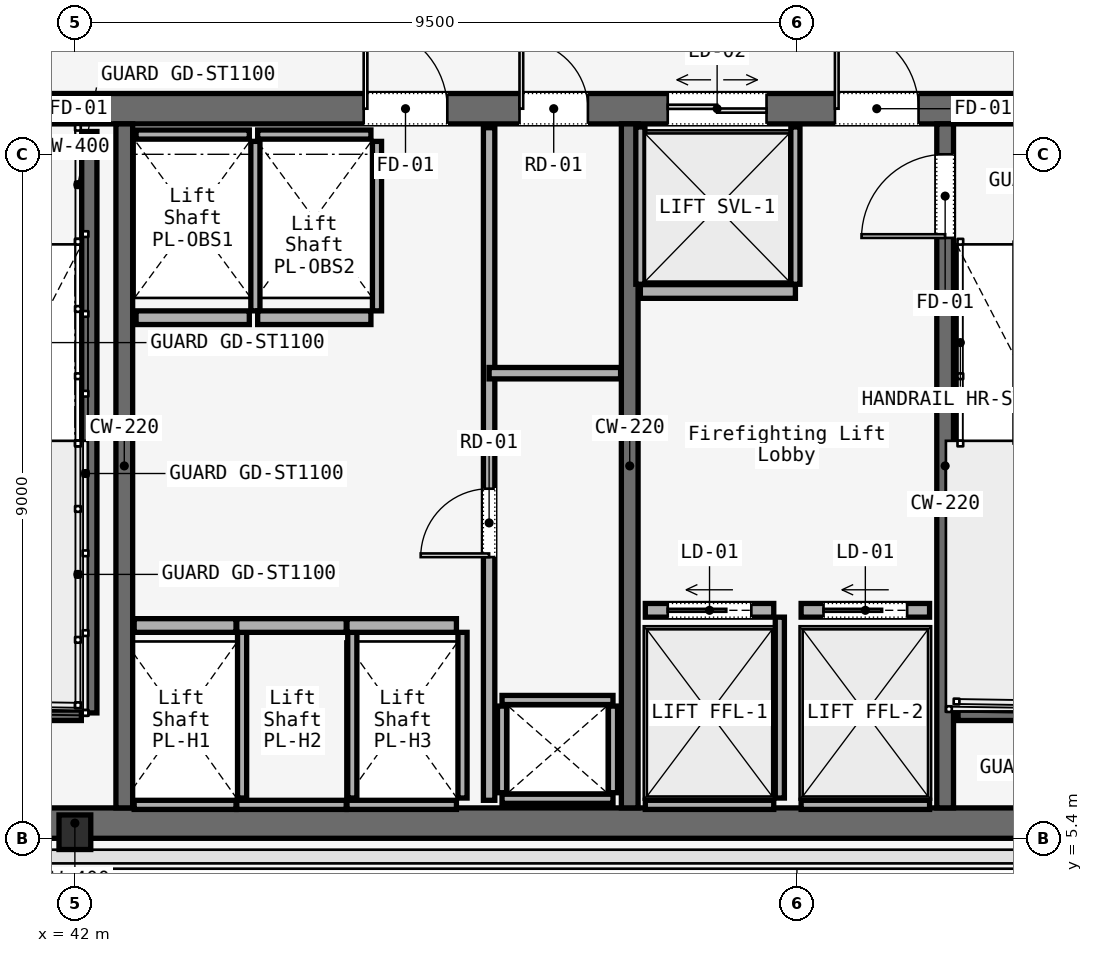
"""IFC4 building model, lengths in metres.
Left out: names, types, materials, properties, quantities, classifications, styles, units other than length and angle.
Written with IfcOpenShell. Run it as: python <this file> out.ifc"""

import sys

from ifc_helpers import new_model, si_unit, direction, frame, frame_2d, origin, origin_2d, place, context, subcontext, project, spatial, rectangle, i_section, extrude, element, fill, save


model = new_model("IFC4")
c1 = context("Model", 3, precision=1e-05, world=origin(), true_north=direction((0.0, 1.0)))
c2 = subcontext(c1, "Body", "Model", "MODEL_VIEW")
j1 = project(units=[si_unit("LENGTHUNIT", "METRE"), si_unit("PLANEANGLEUNIT", "RADIAN")], contexts=[c1])
p1 = place(None, origin())
s1 = spatial("IfcSite", under=j1, at=p1, CompositionType="ELEMENT")
p2 = place(p1, origin())
s2 = spatial("IfcBuilding", under=s1, at=p2, CompositionType="ELEMENT")
p3 = place(p2, frame((0.0, 0.0, 184.0)))
s3 = spatial("IfcBuildingStorey", under=s2, at=p3, CompositionType="ELEMENT", Elevation=184.0)
p4 = place(p3, frame((26.45, 15.0, 0.0), z_axis=(0.0, 0.0, 1.0), x_axis=(1.0, 0.0, 0.0)))
e1 = element("IfcWall", 1, at=p4, inside=s3, PredefinedType="SOLIDWALL", context=c2, shape_type="SweptSolid", body=[
    extrude(rectangle(XDim=31.1, YDim=0.4, at=frame_2d((15.55, 0.0))), origin(), (0.0, 0.0, 1.0), 3.58),
])
p5 = place(p4, frame((1.65, 0.0, 0.0)))
e2 = element("IfcOpeningElement", 2, at=p5, cuts=e1, PredefinedType="OPENING", context=c2, shape_type="SweptSolid", body=[
    extrude(rectangle(XDim=1.1, YDim=2.2, at=frame_2d((0.55, 1.1))), frame((0.0, 0.2, 0.0), z_axis=(0.0, -1.0, 0.0), x_axis=(1.0, 0.0, 0.0)), (0.0, 0.0, 1.0), 0.4),
])
p6 = place(p4, frame((13.65, 0.0, 0.0)))
e3 = element("IfcOpeningElement", 3, at=p6, cuts=e1, PredefinedType="OPENING", context=c2, shape_type="SweptSolid", body=[
    extrude(rectangle(XDim=1.1, YDim=2.2, at=frame_2d((0.55, 1.1))), frame((0.0, 0.2, 0.0), z_axis=(0.0, -1.0, 0.0), x_axis=(1.0, 0.0, 0.0)), (0.0, 0.0, 1.0), 0.4),
])
p7 = place(p4, frame((25.55, 0.0, 0.0)))
e4 = element("IfcOpeningElement", 4, at=p7, cuts=e1, PredefinedType="OPENING", context=c2, shape_type="SweptSolid", body=[
    extrude(rectangle(XDim=1.1, YDim=2.2, at=frame_2d((0.55, 1.1))), frame((0.0, 0.2, 0.0), z_axis=(0.0, -1.0, 0.0), x_axis=(1.0, 0.0, 0.0)), (0.0, 0.0, 1.0), 0.4),
])
p8 = place(p4, frame((10.7, 0.0, 0.0)))
e5 = element("IfcOpeningElement", 5, at=p8, cuts=e1, PredefinedType="OPENING", context=c2, shape_type="SweptSolid", body=[
    extrude(rectangle(XDim=1.4, YDim=2.2, at=frame_2d((0.7, 1.1))), frame((0.0, 0.2, 0.0), z_axis=(0.0, -1.0, 0.0), x_axis=(1.0, 0.0, 0.0)), (0.0, 0.0, 1.0), 0.4),
])
p9 = place(p4, frame((19.35, 0.0, 0.0)))
e6 = element("IfcOpeningElement", 6, at=p9, cuts=e1, PredefinedType="OPENING", context=c2, shape_type="SweptSolid", body=[
    extrude(rectangle(XDim=1.1, YDim=2.2, at=frame_2d((0.55, 1.1))), frame((0.0, 0.2, 0.0), z_axis=(0.0, -1.0, 0.0), x_axis=(1.0, 0.0, 0.0)), (0.0, 0.0, 1.0), 0.4),
])
p10 = place(p4, frame((21.4, 0.0, 0.0)))
e7 = element("IfcOpeningElement", 7, at=p10, cuts=e1, PredefinedType="OPENING", context=c2, shape_type="SweptSolid", body=[
    extrude(rectangle(XDim=0.9, YDim=2.1, at=frame_2d((0.45, 1.05))), frame((0.0, 0.2, 0.0), z_axis=(0.0, -1.0, 0.0), x_axis=(1.0, 0.0, 0.0)), (0.0, 0.0, 1.0), 0.4),
])
p11 = place(p4, frame((23.35, 0.0, 0.0)))
e8 = element("IfcOpeningElement", 8, at=p11, cuts=e1, PredefinedType="OPENING", context=c2, shape_type="SweptSolid", body=[
    extrude(rectangle(XDim=1.3, YDim=2.3, at=frame_2d((0.65, 1.15))), frame((0.0, 0.2, 0.0), z_axis=(0.0, -1.0, 0.0), x_axis=(1.0, 0.0, 0.0)), (0.0, 0.0, 1.0), 0.4),
])
p12 = place(p3, frame((26.45, 5.6, 0.0), z_axis=(0.0, 0.0, 1.0), x_axis=(1.0, 0.0, 0.0)))
e9 = element("IfcWall", 9, at=p12, inside=s3, PredefinedType="SOLIDWALL", context=c2, shape_type="SweptSolid", body=[
    extrude(rectangle(XDim=31.1, YDim=0.4, at=frame_2d((15.55, 0.0))), origin(), (0.0, 0.0, 1.0), 3.58),
])
for number, where, z_axis, x_axis in (
    (10, (42.65, 5.8, 0.0), (0.0, 0.0, 1.0), (0.0, 1.0, 0.0)),
    (11, (49.3, 5.8, 0.0), (0.0, 0.0, 1.0), (0.0, 1.0, 0.0)),
):
    element("IfcWall", number, at=place(p3, frame(where, z_axis=z_axis, x_axis=x_axis)), inside=s3, PredefinedType="SOLIDWALL", context=c2, shape_type="SweptSolid", body=[
        extrude(rectangle(XDim=9.0, YDim=0.22, at=frame_2d((4.5, 0.0))), origin(), (0.0, 0.0, 1.0), 3.58),
    ])
p13 = place(p3, frame((53.45, 5.8, 0.0), z_axis=(0.0, 0.0, 1.0), x_axis=(0.0, 1.0, 0.0)))
e12 = element("IfcWall", 12, at=p13, inside=s3, PredefinedType="SOLIDWALL", context=c2, shape_type="SweptSolid", body=[
    extrude(rectangle(XDim=9.0, YDim=0.22, at=frame_2d((4.5, 0.0))), origin(), (0.0, 0.0, 1.0), 3.58),
])
p14 = place(p13, frame((7.5, 0.0, 0.0)))
e13 = element("IfcOpeningElement", 13, at=p14, cuts=e12, PredefinedType="OPENING", context=c2, shape_type="SweptSolid", body=[
    extrude(rectangle(XDim=1.1, YDim=2.2, at=frame_2d((0.55, 1.1))), frame((0.0, 0.11, 0.0), z_axis=(0.0, -1.0, 0.0), x_axis=(1.0, 0.0, 0.0)), (0.0, 0.0, 1.0), 0.22),
])
p15 = place(p3, frame((42.0, 5.48, 0.0), z_axis=(0.0, 0.0, 1.0), x_axis=(1.0, 0.0, 0.0)))
e14 = element("IfcColumn", 14, at=p15, inside=s3, PredefinedType="COLUMN", context=c2, shape_type="SweptSolid", body=[
    extrude(i_section(OverallWidth=0.418, OverallDepth=0.455, WebThickness=0.042, FlangeThickness=0.052, FilletRadius=0.015, at=origin_2d()), origin(), (0.0, 0.0, 1.0), 3.58),
])
p16 = place(p3, frame((42.19, 14.7, 0.0), z_axis=(0.0, 0.0, 1.0), x_axis=(0.0, -1.0, 0.0)))
e15 = element("IfcWall", 15, at=p16, inside=s3, PredefinedType="SOLIDWALL", context=c2, shape_type="SweptSolid", body=[
    extrude(rectangle(XDim=7.65, YDim=0.2, at=frame_2d((3.825, 0.0))), origin(), (0.0, 0.0, 1.0), 3.8),
])
for number, where, z_axis, x_axis in (
    (16, (38.97, 7.05, 0.0), (0.0, 0.0, 1.0), (1.0, 0.0, 0.0)),
    (17, (53.62, 7.05, 0.0), (0.0, 0.0, 1.0), (1.0, 0.0, 0.0)),
):
    element("IfcWall", number, at=place(p3, frame(where, z_axis=z_axis, x_axis=x_axis)), inside=s3, PredefinedType="SOLIDWALL", context=c2, shape_type="SweptSolid", body=[
        extrude(rectangle(XDim=3.115, YDim=0.2, at=frame_2d((1.558, 0.0))), origin(), (0.0, 0.0, 1.0), 3.8),
    ])
for number, where, z_axis, x_axis in (
    (18, (47.62, 5.92, 0.0), (0.0, 0.0, 1.0), (1.0, 0.0, 0.0)),
    (19, (47.62, 7.22, 0.0), (0.0, 0.0, 1.0), (1.0, 0.0, 0.0)),
):
    element("IfcWall", number, at=place(p3, frame(where, z_axis=z_axis, x_axis=x_axis)), inside=s3, PredefinedType="SOLIDWALL", context=c2, shape_type="SweptSolid", body=[
        extrude(rectangle(XDim=1.46, YDim=0.12, at=frame_2d((0.73, 0.0))), origin(), (0.0, 0.0, 1.0), 3.01),
    ])
for number, where, z_axis, x_axis in (
    (20, (47.62, 6.0, 0.0), (0.0, 0.0, 1.0), (0.0, 1.0, 0.0)),
    (21, (49.08, 6.0, 0.0), (0.0, 0.0, 1.0), (0.0, 1.0, 0.0)),
):
    element("IfcWall", number, at=place(p3, frame(where, z_axis=z_axis, x_axis=x_axis)), inside=s3, PredefinedType="SOLIDWALL", context=c2, shape_type="SweptSolid", body=[
        extrude(rectangle(XDim=1.14, YDim=0.12, at=frame_2d((0.57, 0.0))), origin(), (0.0, 0.0, 1.0), 3.01),
    ])
p17 = place(p3, frame((47.45, 5.9, 0.0), z_axis=(0.0, 0.0, 1.0), x_axis=(0.0, 1.0, 0.0)))
e22 = element("IfcWall", 22, at=p17, inside=s3, PredefinedType="PARTITIONING", context=c2, shape_type="SweptSolid", body=[
    extrude(rectangle(XDim=8.85, YDim=0.15, at=frame_2d((4.425, 0.0))), origin(), (0.0, 0.0, 1.0), 3.01),
])
p18 = place(p17, frame((3.2, 0.0, 0.0)))
e23 = element("IfcOpeningElement", 23, at=p18, cuts=e22, PredefinedType="OPENING", context=c2, shape_type="SweptSolid", body=[
    extrude(rectangle(XDim=0.9, YDim=2.1, at=frame_2d((0.45, 1.05))), frame((0.0, 0.075, 0.0), z_axis=(0.0, -1.0, 0.0), x_axis=(1.0, 0.0, 0.0)), (0.0, 0.0, 1.0), 0.15),
])
p19 = place(p3, frame((47.45, 11.52, 0.0), z_axis=(0.0, 0.0, 1.0), x_axis=(1.0, 0.0, 0.0)))
e24 = element("IfcWall", 24, at=p19, inside=s3, PredefinedType="PARTITIONING", context=c2, shape_type="SweptSolid", body=[
    extrude(rectangle(XDim=1.73, YDim=0.15, at=frame_2d((0.865, 0.0))), origin(), (0.0, 0.0, 1.0), 3.01),
])
p20 = place(p3, frame((42.78, 8.2, 0.0), z_axis=(0.0, 0.0, 1.0), x_axis=(1.0, 0.0, 0.0)))
e25 = element("IfcWall", 25, at=p20, inside=s3, PredefinedType="SOLIDWALL", context=c2, shape_type="SweptSolid", body=[
    extrude(rectangle(XDim=1.34, YDim=0.18, at=frame_2d((0.67, 0.0))), origin(), (0.0, 0.0, 1.0), 3.01),
])
p21 = place(p3, frame((42.78, 5.84, 0.0), z_axis=(0.0, 0.0, 1.0), x_axis=(1.0, 0.0, 0.0)))
e26 = element("IfcWall", 26, at=p21, inside=s3, PredefinedType="SOLIDWALL", context=c2, shape_type="SweptSolid", body=[
    extrude(rectangle(XDim=1.34, YDim=0.12, at=frame_2d((0.67, 0.0))), origin(), (0.0, 0.0, 1.0), 3.01),
])
p22 = place(p3, frame((44.2, 5.93, 0.0), z_axis=(0.0, 0.0, 1.0), x_axis=(0.0, 1.0, 0.0)))
e27 = element("IfcWall", 27, at=p22, inside=s3, PredefinedType="SOLIDWALL", context=c2, shape_type="SweptSolid", body=[
    extrude(rectangle(XDim=2.18, YDim=0.12, at=frame_2d((1.09, 0.0))), origin(), (0.0, 0.0, 1.0), 3.01),
])
p23 = place(p3, frame((44.13, 8.2, 0.0), z_axis=(0.0, 0.0, 1.0), x_axis=(1.0, 0.0, 0.0)))
e28 = element("IfcWall", 28, at=p23, inside=s3, PredefinedType="SOLIDWALL", context=c2, shape_type="SweptSolid", body=[
    extrude(rectangle(XDim=1.44, YDim=0.18, at=frame_2d((0.72, 0.0))), origin(), (0.0, 0.0, 1.0), 3.01),
])
p24 = place(p3, frame((44.13, 5.84, 0.0), z_axis=(0.0, 0.0, 1.0), x_axis=(1.0, 0.0, 0.0)))
e29 = element("IfcWall", 29, at=p24, inside=s3, PredefinedType="SOLIDWALL", context=c2, shape_type="SweptSolid", body=[
    extrude(rectangle(XDim=1.44, YDim=0.12, at=frame_2d((0.72, 0.0))), origin(), (0.0, 0.0, 1.0), 3.01),
])
p25 = place(p3, frame((45.65, 5.93, 0.0), z_axis=(0.0, 0.0, 1.0), x_axis=(0.0, 1.0, 0.0)))
e30 = element("IfcWall", 30, at=p25, inside=s3, PredefinedType="SOLIDWALL", context=c2, shape_type="SweptSolid", body=[
    extrude(rectangle(XDim=2.18, YDim=0.12, at=frame_2d((1.09, 0.0))), origin(), (0.0, 0.0, 1.0), 3.01),
])
p26 = place(p3, frame((45.58, 8.2, 0.0), z_axis=(0.0, 0.0, 1.0), x_axis=(1.0, 0.0, 0.0)))
e31 = element("IfcWall", 31, at=p26, inside=s3, PredefinedType="SOLIDWALL", context=c2, shape_type="SweptSolid", body=[
    extrude(rectangle(XDim=1.44, YDim=0.18, at=frame_2d((0.72, 0.0))), origin(), (0.0, 0.0, 1.0), 3.01),
])
p27 = place(p3, frame((45.58, 5.84, 0.0), z_axis=(0.0, 0.0, 1.0), x_axis=(1.0, 0.0, 0.0)))
e32 = element("IfcWall", 32, at=p27, inside=s3, PredefinedType="SOLIDWALL", context=c2, shape_type="SweptSolid", body=[
    extrude(rectangle(XDim=1.44, YDim=0.12, at=frame_2d((0.72, 0.0))), origin(), (0.0, 0.0, 1.0), 3.01),
])
p28 = place(p3, frame((47.1, 5.93, 0.0), z_axis=(0.0, 0.0, 1.0), x_axis=(0.0, 1.0, 0.0)))
e33 = element("IfcWall", 33, at=p28, inside=s3, PredefinedType="SOLIDWALL", context=c2, shape_type="SweptSolid", body=[
    extrude(rectangle(XDim=2.18, YDim=0.12, at=frame_2d((1.09, 0.0))), origin(), (0.0, 0.0, 1.0), 3.01),
])
p29 = place(p3, frame((42.805, 12.25, 0.0), z_axis=(0.0, 0.0, 1.0), x_axis=(1.0, 0.0, 0.0)))
e34 = element("IfcWall", 34, at=p29, inside=s3, PredefinedType="SOLIDWALL", context=c2, shape_type="SweptSolid", body=[
    extrude(rectangle(XDim=1.49, YDim=0.18, at=frame_2d((0.745, 0.0))), origin(), (0.0, 0.0, 1.0), 3.01),
])
p30 = place(p3, frame((42.805, 14.66, 0.0), z_axis=(0.0, 0.0, 1.0), x_axis=(1.0, 0.0, 0.0)))
e35 = element("IfcWall", 35, at=p30, inside=s3, PredefinedType="SOLIDWALL", context=c2, shape_type="SweptSolid", body=[
    extrude(rectangle(XDim=1.49, YDim=0.12, at=frame_2d((0.745, 0.0))), origin(), (0.0, 0.0, 1.0), 3.01),
])
p31 = place(p3, frame((44.375, 12.34, 0.0), z_axis=(0.0, 0.0, 1.0), x_axis=(0.0, 1.0, 0.0)))
e36 = element("IfcWall", 36, at=p31, inside=s3, PredefinedType="SOLIDWALL", context=c2, shape_type="SweptSolid", body=[
    extrude(rectangle(XDim=2.23, YDim=0.12, at=frame_2d((1.115, 0.0))), origin(), (0.0, 0.0, 1.0), 3.01),
])
p32 = place(p3, frame((44.405, 12.25, 0.0), z_axis=(0.0, 0.0, 1.0), x_axis=(1.0, 0.0, 0.0)))
e37 = element("IfcWall", 37, at=p32, inside=s3, PredefinedType="SOLIDWALL", context=c2, shape_type="SweptSolid", body=[
    extrude(rectangle(XDim=1.49, YDim=0.18, at=frame_2d((0.745, 0.0))), origin(), (0.0, 0.0, 1.0), 3.01),
])
p33 = place(p3, frame((44.405, 14.66, 0.0), z_axis=(0.0, 0.0, 1.0), x_axis=(1.0, 0.0, 0.0)))
e38 = element("IfcWall", 38, at=p33, inside=s3, PredefinedType="SOLIDWALL", context=c2, shape_type="SweptSolid", body=[
    extrude(rectangle(XDim=1.49, YDim=0.12, at=frame_2d((0.745, 0.0))), origin(), (0.0, 0.0, 1.0), 3.01),
])
p34 = place(p3, frame((45.975, 12.34, 0.0), z_axis=(0.0, 0.0, 1.0), x_axis=(0.0, 1.0, 0.0)))
e39 = element("IfcWall", 39, at=p34, inside=s3, PredefinedType="SOLIDWALL", context=c2, shape_type="SweptSolid", body=[
    extrude(rectangle(XDim=2.23, YDim=0.12, at=frame_2d((1.115, 0.0))), origin(), (0.0, 0.0, 1.0), 3.01),
])
p35 = place(p3, frame((49.505, 8.4, 0.0), z_axis=(0.0, 0.0, 1.0), x_axis=(1.0, 0.0, 0.0)))
e40 = element("IfcWall", 40, at=p35, inside=s3, PredefinedType="SOLIDWALL", context=c2, shape_type="SweptSolid", body=[
    extrude(rectangle(XDim=1.69, YDim=0.18, at=frame_2d((0.845, 0.0))), origin(), (0.0, 0.0, 1.0), 3.01),
])
p36 = place(p35, frame((0.295, 0.0, 0.0)))
e41 = element("IfcOpeningElement", 41, at=p36, cuts=e40, PredefinedType="OPENING", context=c2, shape_type="SweptSolid", body=[
    extrude(rectangle(XDim=1.1, YDim=2.2, at=frame_2d((0.55, 1.1))), frame((0.0, 0.09, 0.0), z_axis=(0.0, -1.0, 0.0), x_axis=(1.0, 0.0, 0.0)), (0.0, 0.0, 1.0), 0.18),
])
p37 = place(p3, frame((49.505, 5.84, 0.0), z_axis=(0.0, 0.0, 1.0), x_axis=(1.0, 0.0, 0.0)))
e42 = element("IfcWall", 42, at=p37, inside=s3, PredefinedType="SOLIDWALL", context=c2, shape_type="SweptSolid", body=[
    extrude(rectangle(XDim=1.69, YDim=0.12, at=frame_2d((0.845, 0.0))), origin(), (0.0, 0.0, 1.0), 3.01),
])
p38 = place(p3, frame((51.275, 5.93, 0.0), z_axis=(0.0, 0.0, 1.0), x_axis=(0.0, 1.0, 0.0)))
e43 = element("IfcWall", 43, at=p38, inside=s3, PredefinedType="SOLIDWALL", context=c2, shape_type="SweptSolid", body=[
    extrude(rectangle(XDim=2.38, YDim=0.12, at=frame_2d((1.19, 0.0))), origin(), (0.0, 0.0, 1.0), 3.01),
])
p39 = place(p3, frame((51.555, 8.4, 0.0), z_axis=(0.0, 0.0, 1.0), x_axis=(1.0, 0.0, 0.0)))
e44 = element("IfcWall", 44, at=p39, inside=s3, PredefinedType="SOLIDWALL", context=c2, shape_type="SweptSolid", body=[
    extrude(rectangle(XDim=1.69, YDim=0.18, at=frame_2d((0.845, 0.0))), origin(), (0.0, 0.0, 1.0), 3.01),
])
p40 = place(p39, frame((0.295, 0.0, 0.0)))
e45 = element("IfcOpeningElement", 45, at=p40, cuts=e44, PredefinedType="OPENING", context=c2, shape_type="SweptSolid", body=[
    extrude(rectangle(XDim=1.1, YDim=2.2, at=frame_2d((0.55, 1.1))), frame((0.0, 0.09, 0.0), z_axis=(0.0, -1.0, 0.0), x_axis=(1.0, 0.0, 0.0)), (0.0, 0.0, 1.0), 0.18),
])
p41 = place(p3, frame((51.555, 5.84, 0.0), z_axis=(0.0, 0.0, 1.0), x_axis=(1.0, 0.0, 0.0)))
e46 = element("IfcWall", 46, at=p41, inside=s3, PredefinedType="SOLIDWALL", context=c2, shape_type="SweptSolid", body=[
    extrude(rectangle(XDim=1.69, YDim=0.12, at=frame_2d((0.845, 0.0))), origin(), (0.0, 0.0, 1.0), 3.01),
])
p42 = place(p3, frame((49.44, 12.595, 0.0), z_axis=(0.0, 0.0, 1.0), x_axis=(1.0, 0.0, 0.0)))
e47 = element("IfcWall", 47, at=p42, inside=s3, PredefinedType="SOLIDWALL", context=c2, shape_type="SweptSolid", body=[
    extrude(rectangle(XDim=2.04, YDim=0.18, at=frame_2d((1.02, 0.0))), origin(), (0.0, 0.0, 1.0), 3.01),
])
for number, where, z_axis, x_axis in (
    (48, (49.44, 12.69, 0.0), (0.0, 0.0, 1.0), (0.0, 1.0, 0.0)),
    (49, (51.48, 12.69, 0.0), (0.0, 0.0, 1.0), (0.0, 1.0, 0.0)),
):
    element("IfcWall", number, at=place(p3, frame(where, z_axis=z_axis, x_axis=x_axis)), inside=s3, PredefinedType="SOLIDWALL", context=c2, shape_type="SweptSolid", body=[
        extrude(rectangle(XDim=2.07, YDim=0.12, at=frame_2d((1.035, 0.0))), origin(), (0.0, 0.0, 1.0), 3.01),
    ])
p43 = place(p7, origin())
e50 = element("IfcDoor", 50, at=p43, inside=s3, OperationType="SINGLE_SWING_RIGHT", PredefinedType="DOOR", context=c2, shape_type="SweptSolid", body=[
    extrude(rectangle(XDim=1.1, YDim=2.2, at=frame_2d((0.55, 1.1))), frame((0.0, 0.025, 0.0), z_axis=(0.0, -1.0, 0.0), x_axis=(1.0, 0.0, 0.0)), (0.0, 0.0, 1.0), 0.05),
])
fill(e4, e50)
p44 = place(p9, origin())
e51 = element("IfcDoor", 51, at=p44, inside=s3, OperationType="SINGLE_SWING_LEFT", PredefinedType="DOOR", context=c2, shape_type="SweptSolid", body=[
    extrude(rectangle(XDim=1.1, YDim=2.2, at=frame_2d((0.55, 1.1))), frame((0.0, 0.025, 0.0), z_axis=(0.0, -1.0, 0.0), x_axis=(1.0, 0.0, 0.0)), (0.0, 0.0, 1.0), 0.05),
])
fill(e6, e51)
p45 = place(p10, origin())
e52 = element("IfcDoor", 52, at=p45, inside=s3, OperationType="SINGLE_SWING_LEFT", PredefinedType="DOOR", context=c2, shape_type="SweptSolid", body=[
    extrude(rectangle(XDim=0.9, YDim=2.1, at=frame_2d((0.45, 1.05))), frame((0.0, 0.025, 0.0), z_axis=(0.0, -1.0, 0.0), x_axis=(1.0, 0.0, 0.0)), (0.0, 0.0, 1.0), 0.05),
])
fill(e7, e52)
p46 = place(p14, origin())
e53 = element("IfcDoor", 53, at=p46, inside=s3, OperationType="SINGLE_SWING_LEFT", PredefinedType="DOOR", context=c2, shape_type="SweptSolid", body=[
    extrude(rectangle(XDim=1.1, YDim=2.2, at=frame_2d((0.55, 1.1))), frame((0.0, 0.025, 0.0), z_axis=(0.0, -1.0, 0.0), x_axis=(1.0, 0.0, 0.0)), (0.0, 0.0, 1.0), 0.05),
])
fill(e13, e53)
p47 = place(p18, origin())
e54 = element("IfcDoor", 54, at=p47, inside=s3, OperationType="SINGLE_SWING_LEFT", PredefinedType="DOOR", context=c2, shape_type="SweptSolid", body=[
    extrude(rectangle(XDim=0.9, YDim=2.1, at=frame_2d((0.45, 1.05))), frame((0.0, 0.025, 0.0), z_axis=(0.0, -1.0, 0.0), x_axis=(1.0, 0.0, 0.0)), (0.0, 0.0, 1.0), 0.05),
])
fill(e23, e54)
p48 = place(p36, origin())
e55 = element("IfcDoor", 55, at=p48, inside=s3, OperationType="SLIDING_TO_LEFT", PredefinedType="DOOR", context=c2, shape_type="SweptSolid", body=[
    extrude(rectangle(XDim=1.1, YDim=2.2, at=frame_2d((0.55, 1.1))), frame((0.0, 0.025, 0.0), z_axis=(0.0, -1.0, 0.0), x_axis=(1.0, 0.0, 0.0)), (0.0, 0.0, 1.0), 0.05),
])
fill(e41, e55)
p49 = place(p40, origin())
e56 = element("IfcDoor", 56, at=p49, inside=s3, OperationType="SLIDING_TO_LEFT", PredefinedType="DOOR", context=c2, shape_type="SweptSolid", body=[
    extrude(rectangle(XDim=1.1, YDim=2.2, at=frame_2d((0.55, 1.1))), frame((0.0, 0.025, 0.0), z_axis=(0.0, -1.0, 0.0), x_axis=(1.0, 0.0, 0.0)), (0.0, 0.0, 1.0), 0.05),
])
fill(e45, e56)
p50 = place(p11, origin())
e57 = element("IfcDoor", 57, at=p50, inside=s3, OperationType="DOUBLE_DOOR_SLIDING", PredefinedType="DOOR", context=c2, shape_type="SweptSolid", body=[
    extrude(rectangle(XDim=1.3, YDim=2.3, at=frame_2d((0.65, 1.15))), frame((0.0, 0.025, 0.0), z_axis=(0.0, -1.0, 0.0), x_axis=(1.0, 0.0, 0.0)), (0.0, 0.0, 1.0), 0.05),
])
fill(e8, e57)
save(model, sys.argv[1])
